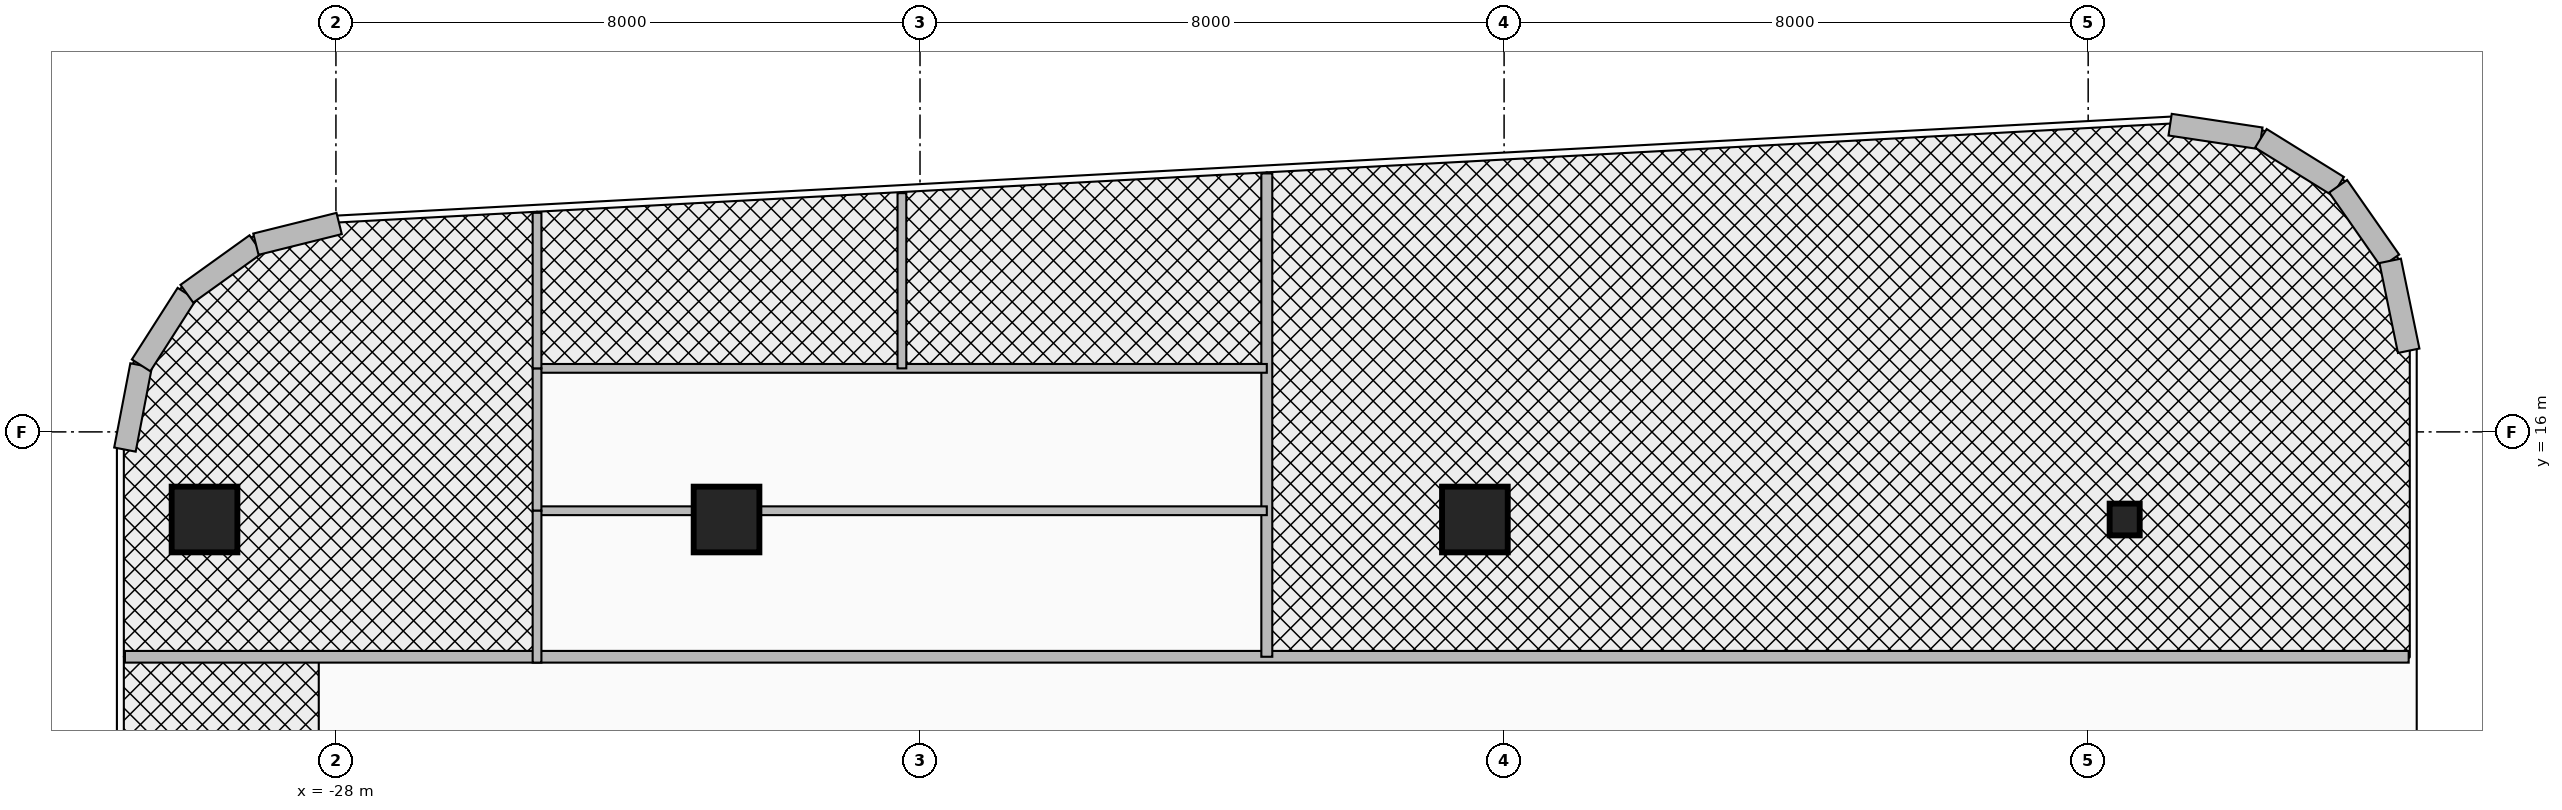
"""IFC4 building model, lengths in metres.
Left out: names, types, materials, properties, quantities, classifications, styles, units other than length and angle.
Written with IfcOpenShell. Run it as: python <this file> out.ifc"""

import sys

from ifc_helpers import new_model, si_unit, direction, frame, frame_2d, origin, origin_2d, place, context, subcontext, project, spatial, rectangle, i_section, extrude, source, transform, mapped, element, fill, save


model = new_model("IFC4")
c1 = context("Model", 3, precision=1e-05, world=origin(), true_north=direction((0.0, 1.0)))
c2 = subcontext(c1, "Body", "Model", "MODEL_VIEW")
j1 = project(units=[si_unit("LENGTHUNIT", "METRE"), si_unit("PLANEANGLEUNIT", "RADIAN")], contexts=[c1])
p1 = place(None, origin())
s1 = spatial("IfcSite", under=j1, at=p1, CompositionType="ELEMENT")
p2 = place(p1, origin())
s2 = spatial("IfcBuilding", under=s1, at=p2, CompositionType="ELEMENT")
p3 = place(p2, frame((0.0, 0.0, 209.0)))
s3 = spatial("IfcBuildingStorey", under=s2, at=p3, CompositionType="ELEMENT", Elevation=209.0)
m1 = source(origin(), c2, "Body", "SweptSolid", [
    extrude(rectangle(XDim=0.9, YDim=0.9, at=origin_2d()), origin(), (0.0, 0.0, 1.0), 3.5),
])
for number, where, z_axis, x_axis in (
    (1, (-29.8, 14.8, 0.0), (0.0, 0.0, 1.0), (1.0, 0.0, 0.0)),
    (2, (-22.65, 14.8, 0.0), (0.0, 0.0, 1.0), (1.0, 0.0, 0.0)),
    (3, (-12.4, 14.8, 0.0), (0.0, 0.0, 1.0), (1.0, 0.0, 0.0)),
):
    element("IfcColumn", number, at=place(p3, frame(where, z_axis=z_axis, x_axis=x_axis)), inside=s3, PredefinedType="COLUMN", context=c2, shape_type="MappedRepresentation", body=[
        mapped(m1, transform((0.0, 0.0, 0.0), x_axis=(1.0, 0.0, 0.0), y_axis=(0.0, 1.0, 0.0), z_axis=(0.0, 0.0, 1.0), scale=1.0)),
    ])
m2 = source(origin(), c2, "Body", "SweptSolid", [
    extrude(i_section(OverallWidth=0.412, OverallDepth=0.435, WebThickness=0.036, FlangeThickness=0.057, at=origin_2d()), origin(), (0.0, 0.0, 1.0), 3.5),
])
p4 = place(p3, frame((-3.5, 14.8, 0.0), z_axis=(0.0, 0.0, 1.0), x_axis=(1.0, 0.0, 0.0)))
e4 = element("IfcColumn", 4, at=p4, inside=s3, PredefinedType="COLUMN", context=c2, shape_type="MappedRepresentation", body=[
    mapped(m2, transform((0.0, 0.0, 0.0), x_axis=(1.0, 0.0, 0.0), y_axis=(0.0, 1.0, 0.0), z_axis=(0.0, 0.0, 1.0), scale=1.0)),
])
p5 = place(p3, frame((-30.89, 15.758, 0.0), z_axis=(0.0, 0.0, 1.0), x_axis=(0.18831542659, 0.982108598938, 0.0)))
e5 = element("IfcWall", 5, at=p5, inside=s3, PredefinedType="SOLIDWALL", context=c2, shape_type="SweptSolid", body=[
    extrude(rectangle(XDim=1.175, YDim=0.3, at=frame_2d((0.587, 0.0))), origin(), (0.0, 0.0, 1.0), 3.26),
])
p6 = place(p3, frame((-30.669, 16.911, 0.0), z_axis=(0.0, 0.0, 1.0), x_axis=(0.538678781902, 0.84251122837, 0.0)))
e6 = element("IfcWall", 6, at=p6, inside=s3, PredefinedType="SOLIDWALL", context=c2, shape_type="SweptSolid", body=[
    extrude(rectangle(XDim=1.164, YDim=0.3, at=frame_2d((0.582, 0.0))), origin(), (0.0, 0.0, 1.0), 3.26),
])
p7 = place(p3, frame((-30.042, 17.892, 0.0), z_axis=(0.0, 0.0, 1.0), x_axis=(0.812313539683, 0.583220981487, 0.0)))
e7 = element("IfcWall", 7, at=p7, inside=s3, PredefinedType="SOLIDWALL", context=c2, shape_type="SweptSolid", body=[
    extrude(rectangle(XDim=1.164, YDim=0.3, at=frame_2d((0.582, 0.0))), origin(), (0.0, 0.0, 1.0), 3.26),
])
p8 = place(p3, frame((-29.096, 18.571, 0.0), z_axis=(0.0, 0.0, 1.0), x_axis=(0.97050812798, 0.241068400098, 0.0)))
e8 = element("IfcWall", 8, at=p8, inside=s3, PredefinedType="SOLIDWALL", context=c2, shape_type="SweptSolid", body=[
    extrude(rectangle(XDim=1.175, YDim=0.3, at=frame_2d((0.587, 0.0))), origin(), (0.0, 0.0, 1.0), 3.26),
])
p9 = place(p3, frame((-2.878, 20.208, 0.0), z_axis=(0.0, 0.0, 1.0), x_axis=(0.988902138571, -0.148568369208, 0.0)))
e9 = element("IfcWall", 9, at=p9, inside=s3, PredefinedType="SOLIDWALL", context=c2, shape_type="SweptSolid", body=[
    extrude(rectangle(XDim=1.257, YDim=0.3, at=frame_2d((0.628, 0.0))), origin(), (0.0, 0.0, 1.0), 3.26),
])
p10 = place(p3, frame((-1.635, 20.021, 0.0), z_axis=(0.0, 0.0, 1.0), x_axis=(0.849646224094, -0.52735310171, 0.0)))
e10 = element("IfcWall", 10, at=p10, inside=s3, PredefinedType="SOLIDWALL", context=c2, shape_type="SweptSolid", body=[
    extrude(rectangle(XDim=1.245, YDim=0.3, at=frame_2d((0.623, 0.0))), origin(), (0.0, 0.0, 1.0), 3.26),
])
p11 = place(p3, frame((-0.576, 19.364, 0.0), z_axis=(0.0, 0.0, 1.0), x_axis=(0.572304219931, -0.820041389107, 0.0)))
e11 = element("IfcWall", 11, at=p11, inside=s3, PredefinedType="SOLIDWALL", context=c2, shape_type="SweptSolid", body=[
    extrude(rectangle(XDim=1.246, YDim=0.3, at=frame_2d((0.623, 0.0))), origin(), (0.0, 0.0, 1.0), 3.26),
])
p12 = place(p3, frame((0.136, 18.343, 0.0), z_axis=(0.0, 0.0, 1.0), x_axis=(0.201603599025, -0.979467196419, 0.0)))
e12 = element("IfcWall", 12, at=p12, inside=s3, PredefinedType="SOLIDWALL", context=c2, shape_type="SweptSolid", body=[
    extrude(rectangle(XDim=1.257, YDim=0.3, at=frame_2d((0.628, 0.0))), origin(), (0.0, 0.0, 1.0), 3.26),
])
p13 = place(p3, frame((-30.89, 12.92, 0.0), z_axis=(0.0, 0.0, 1.0), x_axis=(1.0, 0.0, 0.0)))
e13 = element("IfcWall", 13, at=p13, inside=s3, PredefinedType="PARTITIONING", context=c2, shape_type="SweptSolid", body=[
    extrude(rectangle(XDim=31.28, YDim=0.16, at=frame_2d((15.64, 0.0))), origin(), (0.0, 0.0, 1.0), 2.634),
])
p14 = place(p13, frame((2.347, 0.0, 0.0)))
e14 = element("IfcOpeningElement", 14, at=p14, cuts=e13, PredefinedType="OPENING", context=c2, shape_type="SweptSolid", body=[
    extrude(rectangle(XDim=0.95, YDim=2.15, at=frame_2d((0.475, 1.075))), frame((0.0, 0.095, 0.0), z_axis=(0.0, -1.0, 0.0), x_axis=(1.0, 0.0, 0.0)), (0.0, 0.0, 1.0), 0.19),
])
p15 = place(p13, frame((22.56, 0.0, 0.0)))
e15 = element("IfcOpeningElement", 15, at=p15, cuts=e13, PredefinedType="OPENING", context=c2, shape_type="SweptSolid", body=[
    extrude(rectangle(XDim=1.8, YDim=2.15, at=frame_2d((0.9, 1.075))), frame((0.0, 0.095, 0.0), z_axis=(0.0, -1.0, 0.0), x_axis=(1.0, 0.0, 0.0)), (0.0, 0.0, 1.0), 0.19),
])
p16 = place(p3, frame((-15.25, 12.92, 0.0), z_axis=(0.0, 0.0, 1.0), x_axis=(0.0, 1.0, 0.0)))
e16 = element("IfcWall", 16, at=p16, inside=s3, PredefinedType="PARTITIONING", context=c2, shape_type="SweptSolid", body=[
    extrude(rectangle(XDim=6.62, YDim=0.15, at=frame_2d((3.31, 0.0))), origin(), (0.0, 0.0, 1.0), 2.544),
])
p17 = place(p3, frame((-25.246, 14.92, 0.0), z_axis=(0.0, 0.0, 1.0), x_axis=(1.0, 0.0, 0.0)))
e17 = element("IfcWall", 17, at=p17, inside=s3, PredefinedType="PARTITIONING", context=c2, shape_type="SweptSolid", body=[
    extrude(rectangle(XDim=9.996, YDim=0.12, at=frame_2d((4.998, 0.0))), origin(), (0.0, 0.0, 1.0), 2.544),
])
p18 = place(p3, frame((-25.246, 16.87, 0.0), z_axis=(0.0, 0.0, 1.0), x_axis=(1.0, 0.0, 0.0)))
e18 = element("IfcWall", 18, at=p18, inside=s3, PredefinedType="PARTITIONING", context=c2, shape_type="SweptSolid", body=[
    extrude(rectangle(XDim=9.996, YDim=0.12, at=frame_2d((4.998, 0.0))), origin(), (0.0, 0.0, 1.0), 3.26),
])
p19 = place(p3, frame((-25.246, 14.92, 0.0), z_axis=(0.0, 0.0, 1.0), x_axis=(0.0, 1.0, 0.0)))
e19 = element("IfcWall", 19, at=p19, inside=s3, PredefinedType="PARTITIONING", context=c2, shape_type="SweptSolid", body=[
    extrude(rectangle(XDim=1.95, YDim=0.12, at=frame_2d((0.975, 0.0))), origin(), (0.0, 0.0, 1.0), 2.544),
])
p20 = place(p19, frame((0.55, 0.0, 0.0)))
e20 = element("IfcOpeningElement", 20, at=p20, cuts=e19, PredefinedType="OPENING", context=c2, shape_type="SweptSolid", body=[
    extrude(rectangle(XDim=0.85, YDim=2.1, at=frame_2d((0.425, 1.05))), frame((0.0, 0.075, 0.0), z_axis=(0.0, -1.0, 0.0), x_axis=(1.0, 0.0, 0.0)), (0.0, 0.0, 1.0), 0.15),
])
p21 = place(p3, frame((-25.246, 12.84, 0.0), z_axis=(0.0, 0.0, 1.0), x_axis=(0.0, 1.0, 0.0)))
e21 = element("IfcWall", 21, at=p21, inside=s3, PredefinedType="PARTITIONING", context=c2, shape_type="SweptSolid", body=[
    extrude(rectangle(XDim=2.08, YDim=0.12, at=frame_2d((1.04, 0.0))), origin(), (0.0, 0.0, 1.0), 2.544),
])
p22 = place(p21, frame((0.55, 0.0, 0.0)))
e22 = element("IfcOpeningElement", 22, at=p22, cuts=e21, PredefinedType="OPENING", context=c2, shape_type="SweptSolid", body=[
    extrude(rectangle(XDim=0.9, YDim=2.1, at=frame_2d((0.45, 1.05))), frame((0.0, 0.075, 0.0), z_axis=(0.0, -1.0, 0.0), x_axis=(1.0, 0.0, 0.0)), (0.0, 0.0, 1.0), 0.15),
])
p23 = place(p3, frame((-25.246, 16.87, 0.0), z_axis=(0.0, 0.0, 1.0), x_axis=(0.0, 1.0, 0.0)))
e23 = element("IfcWall", 23, at=p23, inside=s3, PredefinedType="PARTITIONING", context=c2, shape_type="SweptSolid", body=[
    extrude(rectangle(XDim=2.13, YDim=0.12, at=frame_2d((1.065, 0.0))), origin(), (0.0, 0.0, 1.0), 3.26),
])
p24 = place(p23, frame((0.615, 0.0, 0.0)))
e24 = element("IfcOpeningElement", 24, at=p24, cuts=e23, PredefinedType="OPENING", context=c2, shape_type="SweptSolid", body=[
    extrude(rectangle(XDim=0.9, YDim=2.1, at=frame_2d((0.45, 1.05))), frame((0.0, 0.075, 0.0), z_axis=(0.0, -1.0, 0.0), x_axis=(1.0, 0.0, 0.0)), (0.0, 0.0, 1.0), 0.15),
])
p25 = place(p3, frame((-20.248, 16.87, 0.0), z_axis=(0.0, 0.0, 1.0), x_axis=(0.0, 1.0, 0.0)))
e25 = element("IfcWall", 25, at=p25, inside=s3, PredefinedType="PARTITIONING", context=c2, shape_type="SweptSolid", body=[
    extrude(rectangle(XDim=2.4, YDim=0.12, at=frame_2d((1.2, 0.0))), origin(), (0.0, 0.0, 1.0), 3.26),
])
p26 = place(p25, frame((0.9, 0.0, 0.0)))
e26 = element("IfcOpeningElement", 26, at=p26, cuts=e25, PredefinedType="OPENING", context=c2, shape_type="SweptSolid", body=[
    extrude(rectangle(XDim=0.9, YDim=2.1, at=frame_2d((0.45, 1.05))), frame((0.0, 0.075, 0.0), z_axis=(0.0, -1.0, 0.0), x_axis=(1.0, 0.0, 0.0)), (0.0, 0.0, 1.0), 0.15),
])
p27 = place(p14, frame((0.95, 0.0, 0.0), z_axis=(0.0, 0.0, 1.0), x_axis=(-1.0, 0.0, 0.0)))
e27 = element("IfcDoor", 27, at=p27, inside=s3, OperationType="SINGLE_SWING_LEFT", PredefinedType="DOOR", context=c2, shape_type="SweptSolid", body=[
    extrude(rectangle(XDim=0.95, YDim=2.15, at=frame_2d((0.475, 1.075))), frame((0.0, 0.025, 0.0), z_axis=(0.0, -1.0, 0.0), x_axis=(1.0, 0.0, 0.0)), (0.0, 0.0, 1.0), 0.05),
])
fill(e14, e27)
p28 = place(p20, origin())
e28 = element("IfcDoor", 28, at=p28, inside=s3, OperationType="SINGLE_SWING_RIGHT", PredefinedType="DOOR", context=c2, shape_type="SweptSolid", body=[
    extrude(rectangle(XDim=0.85, YDim=2.1, at=frame_2d((0.425, 1.05))), frame((0.0, 0.025, 0.0), z_axis=(0.0, -1.0, 0.0), x_axis=(1.0, 0.0, 0.0)), (0.0, 0.0, 1.0), 0.05),
])
fill(e20, e28)
p29 = place(p22, origin())
e29 = element("IfcDoor", 29, at=p29, inside=s3, OperationType="SINGLE_SWING_LEFT", PredefinedType="DOOR", context=c2, shape_type="SweptSolid", body=[
    extrude(rectangle(XDim=0.9, YDim=2.1, at=frame_2d((0.45, 1.05))), frame((0.0, 0.025, 0.0), z_axis=(0.0, -1.0, 0.0), x_axis=(1.0, 0.0, 0.0)), (0.0, 0.0, 1.0), 0.05),
])
fill(e22, e29)
p30 = place(p24, origin())
e30 = element("IfcDoor", 30, at=p30, inside=s3, OperationType="SINGLE_SWING_RIGHT", PredefinedType="DOOR", context=c2, shape_type="SweptSolid", body=[
    extrude(rectangle(XDim=0.9, YDim=2.1, at=frame_2d((0.45, 1.05))), frame((0.0, 0.025, 0.0), z_axis=(0.0, -1.0, 0.0), x_axis=(1.0, 0.0, 0.0)), (0.0, 0.0, 1.0), 0.05),
])
fill(e24, e30)
p31 = place(p26, frame((0.9, 0.0, 0.0), z_axis=(0.0, 0.0, 1.0), x_axis=(-1.0, 0.0, 0.0)))
e31 = element("IfcDoor", 31, at=p31, inside=s3, OperationType="SINGLE_SWING_LEFT", PredefinedType="DOOR", context=c2, shape_type="SweptSolid", body=[
    extrude(rectangle(XDim=0.9, YDim=2.1, at=frame_2d((0.45, 1.05))), frame((0.0, 0.025, 0.0), z_axis=(0.0, -1.0, 0.0), x_axis=(1.0, 0.0, 0.0)), (0.0, 0.0, 1.0), 0.05),
])
fill(e26, e31)
p32 = place(p15, origin())
e32 = element("IfcDoor", 32, at=p32, inside=s3, OperationType="DOUBLE_DOOR_SINGLE_SWING", PredefinedType="DOOR", context=c2, shape_type="SweptSolid", body=[
    extrude(rectangle(XDim=1.8, YDim=2.15, at=frame_2d((0.9, 1.075))), frame((0.0, 0.025, 0.0), z_axis=(0.0, -1.0, 0.0), x_axis=(1.0, 0.0, 0.0)), (0.0, 0.0, 1.0), 0.05),
])
fill(e15, e32)
save(model, sys.argv[1])
